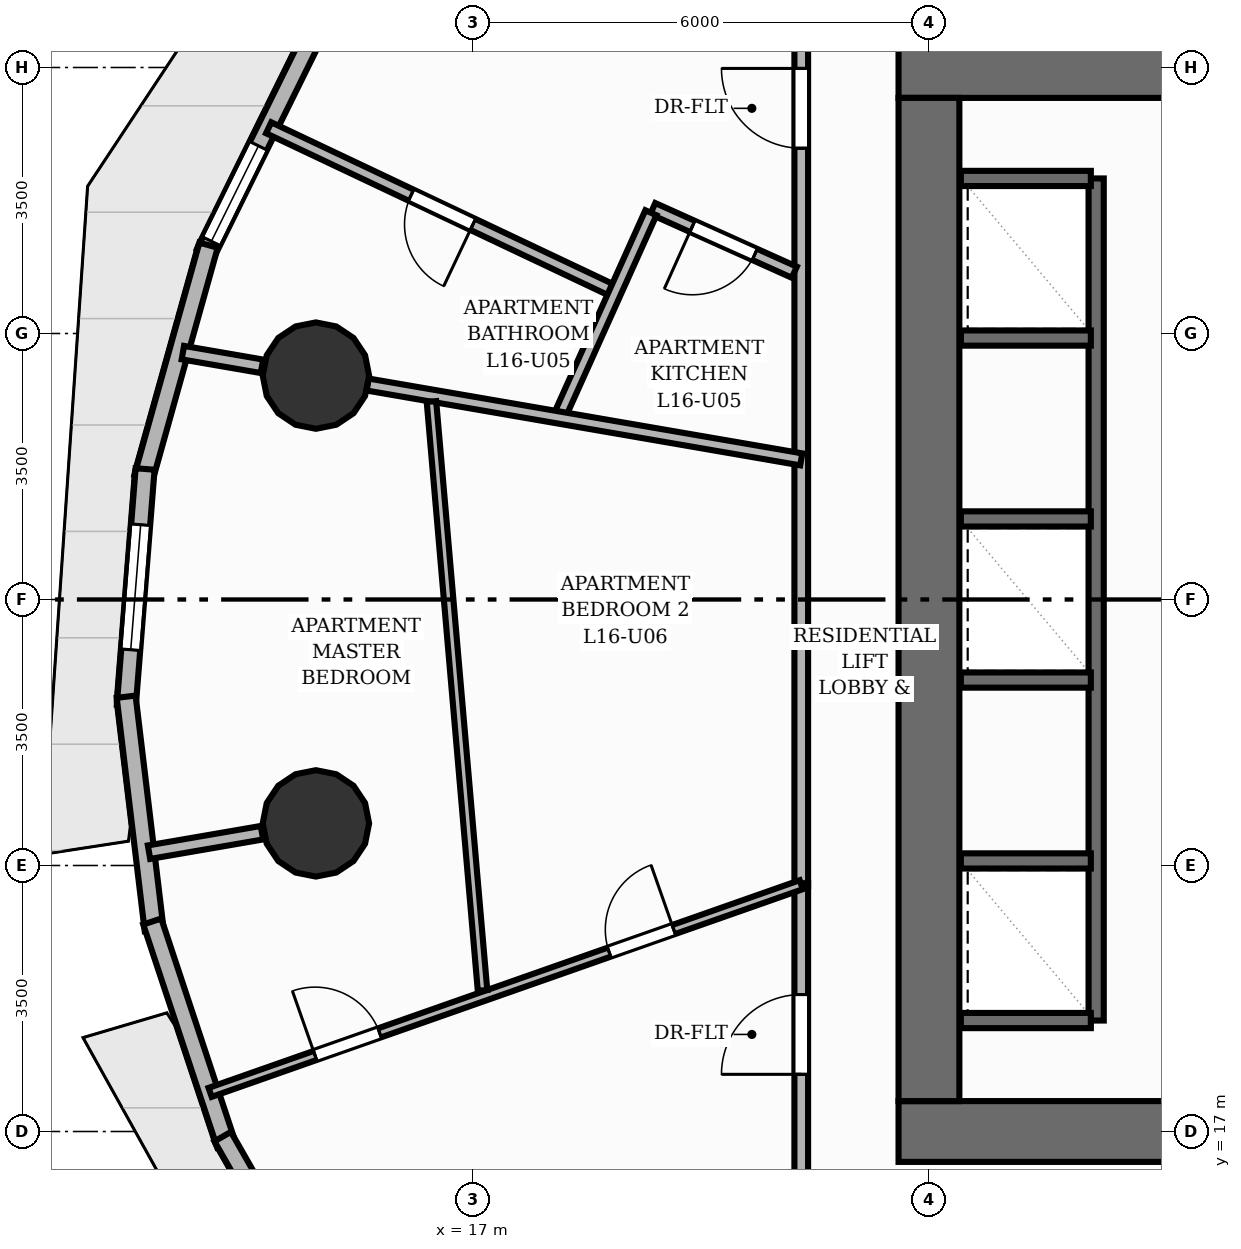
"""IFC4 building model, lengths in metres.
Left out: names, types, materials, properties, quantities, classifications, styles, units other than length and angle.
Written with IfcOpenShell. Run it as: python <this file> out.ifc"""

import sys

from ifc_helpers import new_model, si_unit, direction, frame, frame_2d, origin, origin_2d, place, context, subcontext, project, spatial, rectangle, circle, extrude, element, fill, save


model = new_model("IFC4")
c1 = context("Model", 3, precision=1e-05, world=origin(), true_north=direction((0.0, 1.0)))
c2 = subcontext(c1, "Body", "Model", "MODEL_VIEW")
j1 = project(units=[si_unit("LENGTHUNIT", "METRE"), si_unit("PLANEANGLEUNIT", "RADIAN")], contexts=[c1])
p1 = place(None, origin())
s1 = spatial("IfcSite", under=j1, at=p1, CompositionType="ELEMENT")
p2 = place(p1, origin())
s2 = spatial("IfcBuilding", under=s1, at=p2, CompositionType="ELEMENT")
p3 = place(p2, frame((0.0, 0.0, 56.8)))
s3 = spatial("IfcBuildingStorey", under=s2, at=p3, CompositionType="ELEMENT", Elevation=56.8)
p4 = place(p3, frame((22.6, 17.0, 0.0), z_axis=(0.0, 0.0, 1.0), x_axis=(1.0, 0.0, 0.0)))
e1 = element("IfcWall", 1, at=p4, inside=s3, PredefinedType="SHEAR", context=c2, shape_type="SweptSolid", body=[
    extrude(rectangle(XDim=18.8, YDim=0.8, at=frame_2d((9.4, 0.0))), origin(), (0.0, 0.0, 1.0), 3.2),
])
p5 = place(p4, frame((5.9, 0.0, 0.0)))
e2 = element("IfcOpeningElement", 2, at=p5, cuts=e1, PredefinedType="OPENING", context=c2, shape_type="SweptSolid", body=[
    extrude(rectangle(XDim=1.1, YDim=2.15, at=frame_2d((0.55, 1.075))), frame((0.0, 0.41, 0.0), z_axis=(0.0, -1.0, 0.0), x_axis=(1.0, 0.0, 0.0)), (0.0, 0.0, 1.0), 0.82),
])
p6 = place(p4, frame((9.45, 0.0, 0.0)))
e3 = element("IfcOpeningElement", 3, at=p6, cuts=e1, PredefinedType="OPENING", context=c2, shape_type="SweptSolid", body=[
    extrude(rectangle(XDim=0.9, YDim=2.1, at=frame_2d((0.45, 1.05))), frame((0.0, 0.41, 0.0), z_axis=(0.0, -1.0, 0.0), x_axis=(1.0, 0.0, 0.0)), (0.0, 0.0, 1.0), 0.82),
])
p7 = place(p3, frame((22.6, 31.0, 0.0), z_axis=(0.0, 0.0, 1.0), x_axis=(1.0, 0.0, 0.0)))
e4 = element("IfcWall", 4, at=p7, inside=s3, PredefinedType="SHEAR", context=c2, shape_type="SweptSolid", body=[
    extrude(rectangle(XDim=18.8, YDim=0.8, at=frame_2d((9.4, 0.0))), origin(), (0.0, 0.0, 1.0), 3.2),
])
p8 = place(p7, frame((11.8, 0.0, 0.0)))
e5 = element("IfcOpeningElement", 5, at=p8, cuts=e4, PredefinedType="OPENING", context=c2, shape_type="SweptSolid", body=[
    extrude(rectangle(XDim=1.1, YDim=2.15, at=frame_2d((0.55, 1.075))), frame((0.0, 0.41, 0.0), z_axis=(0.0, -1.0, 0.0), x_axis=(1.0, 0.0, 0.0)), (0.0, 0.0, 1.0), 0.82),
])
p9 = place(p3, frame((23.0, 17.4, 0.0), z_axis=(0.0, 0.0, 1.0), x_axis=(0.0, 1.0, 0.0)))
e6 = element("IfcWall", 6, at=p9, inside=s3, PredefinedType="SHEAR", context=c2, shape_type="SweptSolid", body=[
    extrude(rectangle(XDim=13.2, YDim=0.8, at=frame_2d((6.6, 0.0))), origin(), (0.0, 0.0, 1.0), 3.2),
])
for number, where, z_axis, x_axis in (
    (7, (14.934, 26.946, 0.0), (0.0, 0.0, 1.0), (1.0, 0.0, 0.0)),
    (8, (14.934, 21.054, 0.0), (0.0, 0.0, 1.0), (1.0, 0.0, 0.0)),
):
    element("IfcColumn", number, at=place(p3, frame(where, z_axis=z_axis, x_axis=x_axis)), inside=s3, PredefinedType="COLUMN", context=c2, shape_type="SweptSolid", body=[
        extrude(circle(Radius=0.7, at=origin_2d()), origin(), (0.0, 0.0, 1.0), 3.2),
    ])
p10 = place(p3, frame((13.482, 28.557, 0.0), z_axis=(0.0, 0.0, 1.0), x_axis=(0.44260255462, 0.896717892452, 0.0)))
e9 = element("IfcWall", 9, at=p10, inside=s3, PredefinedType="SOLIDWALL", context=c2, shape_type="SweptSolid", body=[
    extrude(rectangle(XDim=3.245, YDim=0.25, at=frame_2d((1.622, 0.0))), origin(), (0.0, 0.0, 1.0), 2.96),
])
p11 = place(p10, frame((0.175, 0.0, 0.85)))
e10 = element("IfcOpeningElement", 10, at=p11, cuts=e9, PredefinedType="OPENING", context=c2, shape_type="SweptSolid", body=[
    extrude(rectangle(XDim=1.4, YDim=1.55, at=frame_2d((0.7, 0.775))), frame((0.0, 0.135, 0.0), z_axis=(0.0, -1.0, 0.0), x_axis=(1.0, 0.0, 0.0)), (0.0, 0.0, 1.0), 0.27),
])
p12 = place(p3, frame((12.667, 25.605, 0.0), z_axis=(0.0, 0.0, 1.0), x_axis=(0.269353183383, 0.963041464632, 0.0)))
e11 = element("IfcWall", 11, at=p12, inside=s3, PredefinedType="SOLIDWALL", context=c2, shape_type="SweptSolid", body=[
    extrude(rectangle(XDim=3.174, YDim=0.25, at=frame_2d((1.587, 0.0))), origin(), (0.0, 0.0, 1.0), 2.96),
])
p13 = place(p3, frame((12.44, 22.606, 0.0), z_axis=(0.0, 0.0, 1.0), x_axis=(0.079173066737, 0.996860885733, 0.0)))
e12 = element("IfcWall", 12, at=p13, inside=s3, PredefinedType="SOLIDWALL", context=c2, shape_type="SweptSolid", body=[
    extrude(rectangle(XDim=3.121, YDim=0.25, at=frame_2d((1.56, 0.0))), origin(), (0.0, 0.0, 1.0), 2.96),
])
p14 = place(p13, frame((0.735, 0.0, 0.85)))
e13 = element("IfcOpeningElement", 13, at=p14, cuts=e12, PredefinedType="OPENING", context=c2, shape_type="SweptSolid", body=[
    extrude(rectangle(XDim=1.65, YDim=1.55, at=frame_2d((0.825, 0.775))), frame((0.0, 0.135, 0.0), z_axis=(0.0, -1.0, 0.0), x_axis=(1.0, 0.0, 0.0)), (0.0, 0.0, 1.0), 0.27),
])
p15 = place(p3, frame((12.806, 19.651, 0.0), z_axis=(0.0, 0.0, 1.0), x_axis=(-0.119310240224, 0.992857022223, 0.0)))
e14 = element("IfcWall", 14, at=p15, inside=s3, PredefinedType="SOLIDWALL", context=c2, shape_type="SweptSolid", body=[
    extrude(rectangle(XDim=3.092, YDim=0.25, at=frame_2d((1.546, 0.0))), origin(), (0.0, 0.0, 1.0), 2.96),
])
p16 = place(p3, frame((13.755, 16.828, 0.0), z_axis=(0.0, 0.0, 1.0), x_axis=(-0.314806164357, 0.949155982377, 0.0)))
e15 = element("IfcWall", 15, at=p16, inside=s3, PredefinedType="SOLIDWALL", context=c2, shape_type="SweptSolid", body=[
    extrude(rectangle(XDim=3.092, YDim=0.25, at=frame_2d((1.546, 0.0))), origin(), (0.0, 0.0, 1.0), 2.96),
])
p17 = place(p3, frame((15.256, 14.223, 0.0), z_axis=(0.0, 0.0, 1.0), x_axis=(-0.496155788519, 0.868233513243, 0.0)))
e16 = element("IfcWall", 16, at=p17, inside=s3, PredefinedType="SOLIDWALL", context=c2, shape_type="SweptSolid", body=[
    extrude(rectangle(XDim=3.121, YDim=0.25, at=frame_2d((1.56, 0.0))), origin(), (0.0, 0.0, 1.0), 2.96),
])
p18 = place(p17, frame((0.735, 0.0, 0.85)))
e17 = element("IfcOpeningElement", 17, at=p18, cuts=e16, PredefinedType="OPENING", context=c2, shape_type="SweptSolid", body=[
    extrude(rectangle(XDim=1.65, YDim=1.55, at=frame_2d((0.825, 0.775))), frame((0.0, 0.135, 0.0), z_axis=(0.0, -1.0, 0.0), x_axis=(1.0, 0.0, 0.0)), (0.0, 0.0, 1.0), 0.27),
])
p19 = place(p3, frame((25.2, 18.46, 0.0), z_axis=(0.0, 0.0, 1.0), x_axis=(0.0, 1.0, 0.0)))
e18 = element("IfcWall", 18, at=p19, inside=s3, PredefinedType="SHEAR", context=c2, shape_type="SweptSolid", body=[
    extrude(rectangle(XDim=11.08, YDim=0.2, at=frame_2d((5.54, 0.0))), origin(), (0.0, 0.0, 1.0), 3.2),
])
for number, where, z_axis, x_axis in (
    (19, (23.42, 18.46, 0.0), (0.0, 0.0, 1.0), (1.0, 0.0, 0.0)),
    (20, (23.42, 29.54, 0.0), (0.0, 0.0, 1.0), (1.0, 0.0, 0.0)),
    (21, (23.42, 20.56, 0.0), (0.0, 0.0, 1.0), (1.0, 0.0, 0.0)),
    (22, (23.42, 22.94, 0.0), (0.0, 0.0, 1.0), (1.0, 0.0, 0.0)),
    (23, (23.42, 25.06, 0.0), (0.0, 0.0, 1.0), (1.0, 0.0, 0.0)),
    (24, (23.42, 27.44, 0.0), (0.0, 0.0, 1.0), (1.0, 0.0, 0.0)),
):
    element("IfcWall", number, at=place(p3, frame(where, z_axis=z_axis, x_axis=x_axis)), inside=s3, PredefinedType="SHEAR", context=c2, shape_type="SweptSolid", body=[
        extrude(rectangle(XDim=1.71, YDim=0.2, at=frame_2d((0.855, 0.0))), origin(), (0.0, 0.0, 1.0), 3.2),
    ])
p20 = place(p3, frame((14.225, 27.068, 0.0), z_axis=(0.0, 0.0, 1.0), x_axis=(-0.985428074572, 0.17009265077, 0.0)))
e25 = element("IfcWall", 25, at=p20, inside=s3, PredefinedType="PARTITIONING", context=c2, shape_type="SweptSolid", body=[
    extrude(rectangle(XDim=1.056, YDim=0.18, at=frame_2d((0.528, 0.0))), origin(), (0.0, 0.0, 1.0), 2.178),
])
p21 = place(p3, frame((14.225, 20.932, 0.0), z_axis=(0.0, 0.0, 1.0), x_axis=(-0.985418960314, -0.170145445587, 0.0)))
e26 = element("IfcWall", 26, at=p21, inside=s3, PredefinedType="PARTITIONING", context=c2, shape_type="SweptSolid", body=[
    extrude(rectangle(XDim=1.508, YDim=0.18, at=frame_2d((0.754, 0.0))), origin(), (0.0, 0.0, 1.0), 2.178),
])
p22 = place(p3, frame((21.32, 20.226, 0.0), z_axis=(0.0, 0.0, 1.0), x_axis=(0.0, 1.0, 0.0)))
e27 = element("IfcWall", 27, at=p22, inside=s3, PredefinedType="PARTITIONING", context=c2, shape_type="SweptSolid", body=[
    extrude(rectangle(XDim=12.454, YDim=0.18, at=frame_2d((6.227, 0.0))), origin(), (0.0, 0.0, 1.0), 2.955),
])
p23 = place(p22, frame((9.711, 0.0, 0.0)))
e28 = element("IfcOpeningElement", 28, at=p23, cuts=e27, PredefinedType="OPENING", context=c2, shape_type="SweptSolid", body=[
    extrude(rectangle(XDim=1.05, YDim=2.15, at=frame_2d((0.525, 1.075))), frame((0.0, 0.1, 0.0), z_axis=(0.0, -1.0, 0.0), x_axis=(1.0, 0.0, 0.0)), (0.0, 0.0, 1.0), 0.2),
])
p24 = place(p3, frame((21.32, 15.32, 0.0), z_axis=(0.0, 0.0, 1.0), x_axis=(0.0, 1.0, 0.0)))
e29 = element("IfcWall", 29, at=p24, inside=s3, PredefinedType="PARTITIONING", context=c2, shape_type="SweptSolid", body=[
    extrude(rectangle(XDim=4.947, YDim=0.18, at=frame_2d((2.474, 0.0))), origin(), (0.0, 0.0, 1.0), 2.955),
])
p25 = place(p24, frame((2.432, 0.0, 0.0)))
e30 = element("IfcOpeningElement", 30, at=p25, cuts=e29, PredefinedType="OPENING", context=c2, shape_type="SweptSolid", body=[
    extrude(rectangle(XDim=1.05, YDim=2.15, at=frame_2d((0.525, 1.075))), frame((0.0, 0.1, 0.0), z_axis=(0.0, -1.0, 0.0), x_axis=(1.0, 0.0, 0.0)), (0.0, 0.0, 1.0), 0.2),
])
p26 = place(p3, frame((18.874, 28.048, 0.0), z_axis=(0.0, 0.0, 1.0), x_axis=(-0.903875714014, 0.427795153801, 0.0)))
e31 = element("IfcWall", 31, at=p26, inside=s3, PredefinedType="PLUMBINGWALL", context=c2, shape_type="SweptSolid", body=[
    extrude(rectangle(XDim=5.046, YDim=0.16, at=frame_2d((2.523, 0.0))), origin(), (0.0, 0.0, 1.0), 2.641),
])
p27 = place(p26, frame((2.073, 0.0, 0.0)))
e32 = element("IfcOpeningElement", 32, at=p27, cuts=e31, PredefinedType="OPENING", context=c2, shape_type="SweptSolid", body=[
    extrude(rectangle(XDim=0.9, YDim=2.1, at=frame_2d((0.45, 1.05))), frame((0.0, 0.09, 0.0), z_axis=(0.0, -1.0, 0.0), x_axis=(1.0, 0.0, 0.0)), (0.0, 0.0, 1.0), 0.18),
])
p28 = place(p3, frame((21.229, 28.306, 0.0), z_axis=(0.0, 0.0, 1.0), x_axis=(-0.912062415561, 0.410051399365, 0.0)))
e33 = element("IfcWall", 33, at=p28, inside=s3, PredefinedType="PLUMBINGWALL", context=c2, shape_type="SweptSolid", body=[
    extrude(rectangle(XDim=2.042, YDim=0.16, at=frame_2d((1.021, 0.0))), origin(), (0.0, 0.0, 1.0), 2.641),
])
p29 = place(p28, frame((0.571, 0.0, 0.0)))
e34 = element("IfcOpeningElement", 34, at=p29, cuts=e33, PredefinedType="OPENING", context=c2, shape_type="SweptSolid", body=[
    extrude(rectangle(XDim=0.9, YDim=2.1, at=frame_2d((0.45, 1.05))), frame((0.0, 0.09, 0.0), z_axis=(0.0, -1.0, 0.0), x_axis=(1.0, 0.0, 0.0)), (0.0, 0.0, 1.0), 0.18),
])
p30 = place(p3, frame((19.342, 29.089, 0.0), z_axis=(0.0, 0.0, 1.0), x_axis=(-0.410144748917, -0.912020441073, 0.0)))
e35 = element("IfcWall", 35, at=p30, inside=s3, PredefinedType="PLUMBINGWALL", context=c2, shape_type="SweptSolid", body=[
    extrude(rectangle(XDim=2.954, YDim=0.16, at=frame_2d((1.477, 0.0))), origin(), (0.0, 0.0, 1.0), 2.955),
])
p31 = place(p3, frame((21.32, 25.844, 0.0), z_axis=(0.0, 0.0, 1.0), x_axis=(-0.985429175336, 0.170086273394, 0.0)))
e36 = element("IfcWall", 36, at=p31, inside=s3, PredefinedType="PLUMBINGWALL", context=c2, shape_type="SweptSolid", body=[
    extrude(rectangle(XDim=5.789, YDim=0.16, at=frame_2d((2.895, 0.0))), origin(), (0.0, 0.0, 1.0), 2.178),
])
p32 = place(p3, frame((13.543, 17.515, 0.0), z_axis=(0.0, 0.0, 1.0), x_axis=(0.943466147543, 0.331468895131, 0.0)))
e37 = element("IfcWall", 37, at=p32, inside=s3, PredefinedType="PARTITIONING", context=c2, shape_type="SweptSolid", body=[
    extrude(rectangle(XDim=8.243, YDim=0.125, at=frame_2d((4.122, 0.0))), origin(), (0.0, 0.0, 1.0), 2.955),
])
p33 = place(p32, frame((1.463, 0.0, 0.0)))
e38 = element("IfcOpeningElement", 38, at=p33, cuts=e37, PredefinedType="OPENING", context=c2, shape_type="SweptSolid", body=[
    extrude(rectangle(XDim=0.9, YDim=2.1, at=frame_2d((0.45, 1.05))), frame((0.0, 0.073, 0.0), z_axis=(0.0, -1.0, 0.0), x_axis=(1.0, 0.0, 0.0)), (0.0, 0.0, 1.0), 0.145),
])
p34 = place(p32, frame((5.565, 0.0, 0.0)))
e39 = element("IfcOpeningElement", 39, at=p34, cuts=e37, PredefinedType="OPENING", context=c2, shape_type="SweptSolid", body=[
    extrude(rectangle(XDim=0.9, YDim=2.1, at=frame_2d((0.45, 1.05))), frame((0.0, 0.073, 0.0), z_axis=(0.0, -1.0, 0.0), x_axis=(1.0, 0.0, 0.0)), (0.0, 0.0, 1.0), 0.145),
])
p35 = place(p3, frame((16.455, 26.605, 0.0), z_axis=(0.0, 0.0, 1.0), x_axis=(0.086414248462, -0.996259292385, 0.0)))
e40 = element("IfcWall", 40, at=p35, inside=s3, PredefinedType="PARTITIONING", context=c2, shape_type="SweptSolid", body=[
    extrude(rectangle(XDim=7.778, YDim=0.125, at=frame_2d((3.889, 0.0))), origin(), (0.0, 0.0, 1.0), 2.955),
])
p36 = place(p11, origin())
e41 = element("IfcWindow", 41, at=p36, inside=s3, PartitioningType="SINGLE_PANEL", PredefinedType="WINDOW", context=c2, shape_type="SweptSolid", body=[
    extrude(rectangle(XDim=1.4, YDim=1.55, at=frame_2d((0.7, 0.775))), frame((0.0, 0.03, 0.0), z_axis=(0.0, -1.0, 0.0), x_axis=(1.0, 0.0, 0.0)), (0.0, 0.0, 1.0), 0.06),
])
fill(e10, e41)
p37 = place(p14, origin())
e42 = element("IfcWindow", 42, at=p37, inside=s3, PartitioningType="SINGLE_PANEL", PredefinedType="WINDOW", context=c2, shape_type="SweptSolid", body=[
    extrude(rectangle(XDim=1.65, YDim=1.55, at=frame_2d((0.825, 0.775))), frame((0.0, 0.03, 0.0), z_axis=(0.0, -1.0, 0.0), x_axis=(1.0, 0.0, 0.0)), (0.0, 0.0, 1.0), 0.06),
])
fill(e13, e42)
p38 = place(p23, origin())
e43 = element("IfcDoor", 43, at=p38, inside=s3, OperationType="SINGLE_SWING_RIGHT", PredefinedType="DOOR", context=c2, shape_type="SweptSolid", body=[
    extrude(rectangle(XDim=1.05, YDim=2.15, at=frame_2d((0.525, 1.075))), frame((0.0, 0.025, 0.0), z_axis=(0.0, -1.0, 0.0), x_axis=(1.0, 0.0, 0.0)), (0.0, 0.0, 1.0), 0.05),
])
fill(e28, e43)
p39 = place(p27, origin())
e44 = element("IfcDoor", 44, at=p39, inside=s3, OperationType="SINGLE_SWING_LEFT", PredefinedType="DOOR", context=c2, shape_type="SweptSolid", body=[
    extrude(rectangle(XDim=0.9, YDim=2.1, at=frame_2d((0.45, 1.05))), frame((0.0, 0.025, 0.0), z_axis=(0.0, -1.0, 0.0), x_axis=(1.0, 0.0, 0.0)), (0.0, 0.0, 1.0), 0.05),
])
fill(e32, e44)
p40 = place(p29, origin())
e45 = element("IfcDoor", 45, at=p40, inside=s3, OperationType="SINGLE_SWING_RIGHT", PredefinedType="DOOR", context=c2, shape_type="SweptSolid", body=[
    extrude(rectangle(XDim=0.9, YDim=2.1, at=frame_2d((0.45, 1.05))), frame((0.0, 0.025, 0.0), z_axis=(0.0, -1.0, 0.0), x_axis=(1.0, 0.0, 0.0)), (0.0, 0.0, 1.0), 0.05),
])
fill(e34, e45)
p41 = place(p25, origin())
e46 = element("IfcDoor", 46, at=p41, inside=s3, OperationType="SINGLE_SWING_LEFT", PredefinedType="DOOR", context=c2, shape_type="SweptSolid", body=[
    extrude(rectangle(XDim=1.05, YDim=2.15, at=frame_2d((0.525, 1.075))), frame((0.0, 0.025, 0.0), z_axis=(0.0, -1.0, 0.0), x_axis=(1.0, 0.0, 0.0)), (0.0, 0.0, 1.0), 0.05),
])
fill(e30, e46)
p42 = place(p33, origin())
e47 = element("IfcDoor", 47, at=p42, inside=s3, OperationType="SINGLE_SWING_LEFT", PredefinedType="DOOR", context=c2, shape_type="SweptSolid", body=[
    extrude(rectangle(XDim=0.9, YDim=2.1, at=frame_2d((0.45, 1.05))), frame((0.0, 0.025, 0.0), z_axis=(0.0, -1.0, 0.0), x_axis=(1.0, 0.0, 0.0)), (0.0, 0.0, 1.0), 0.05),
])
fill(e38, e47)
p43 = place(p34, origin())
e48 = element("IfcDoor", 48, at=p43, inside=s3, OperationType="SINGLE_SWING_RIGHT", PredefinedType="DOOR", context=c2, shape_type="SweptSolid", body=[
    extrude(rectangle(XDim=0.9, YDim=2.1, at=frame_2d((0.45, 1.05))), frame((0.0, 0.025, 0.0), z_axis=(0.0, -1.0, 0.0), x_axis=(1.0, 0.0, 0.0)), (0.0, 0.0, 1.0), 0.05),
])
fill(e39, e48)
save(model, sys.argv[1])
